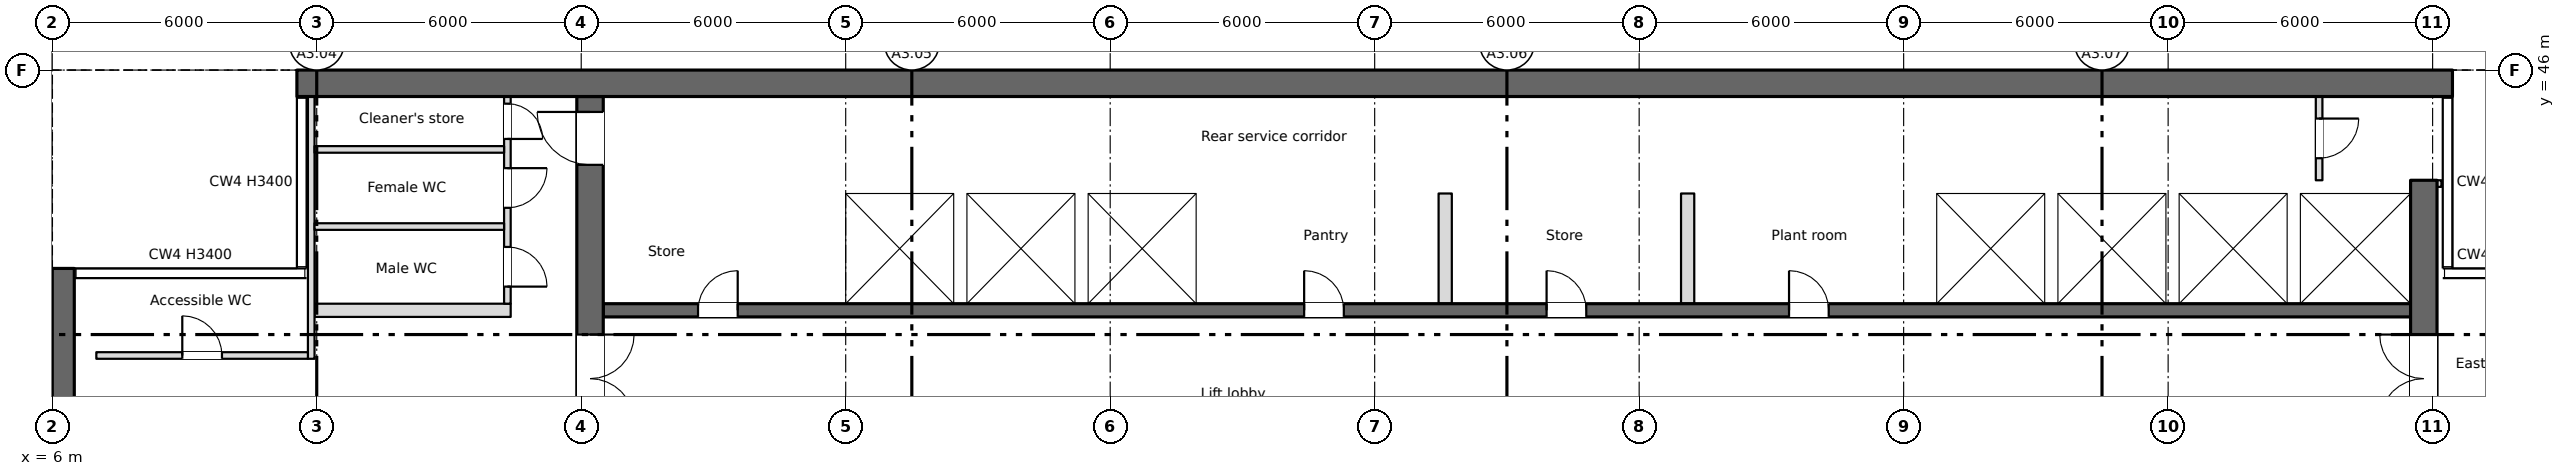
"""IFC4 building model, lengths in metres.
Left out: names, types, materials, properties, quantities, classifications, styles, units other than length and angle.
Written with IfcOpenShell. Run it as: python <this file> out.ifc"""

import sys

from ifc_helpers import new_model, si_unit, direction, frame, frame_2d, origin, place, context, subcontext, project, spatial, rectangle, extrude, element, fill, save


model = new_model("IFC4")
c1 = context("Model", 3, precision=1e-05, world=origin(), true_north=direction((0.0, 1.0)))
c2 = subcontext(c1, "Body", "Model", "MODEL_VIEW")
j1 = project(units=[si_unit("LENGTHUNIT", "METRE"), si_unit("PLANEANGLEUNIT", "RADIAN")], contexts=[c1])
p1 = place(None, origin())
s1 = spatial("IfcSite", under=j1, at=p1, CompositionType="ELEMENT")
p2 = place(p1, origin())
s2 = spatial("IfcBuilding", under=s1, at=p2, CompositionType="ELEMENT")
p3 = place(p2, frame((0.0, 0.0, 258.35)))
s3 = spatial("IfcBuildingStorey", under=s2, at=p3, CompositionType="ELEMENT", Elevation=258.35)
p4 = place(p3, frame((6.25, 8.5, 0.0), z_axis=(0.0, 0.0, 1.0), x_axis=(0.0, 1.0, 0.0)))
e1 = element("IfcWall", 1, at=p4, inside=s3, PredefinedType="SHEAR", context=c2, shape_type="SweptSolid", body=[
    extrude(rectangle(XDim=33.0, YDim=0.5, at=frame_2d((16.5, 0.0))), origin(), (0.0, 0.0, 1.0), 3.4),
])
p5 = place(p4, frame((1.2, 0.0, 0.6)))
e2 = element("IfcOpeningElement", 2, at=p5, cuts=e1, PredefinedType="OPENING", context=c2, shape_type="SweptSolid", body=[
    extrude(rectangle(XDim=0.6, YDim=2.4, at=frame_2d((0.3, 1.2))), frame((0.0, 0.26, 0.0), z_axis=(0.0, -1.0, 0.0), x_axis=(1.0, 0.0, 0.0)), (0.0, 0.0, 1.0), 0.52),
])
p6 = place(p4, frame((7.2, 0.0, 0.6)))
e3 = element("IfcOpeningElement", 3, at=p6, cuts=e1, PredefinedType="OPENING", context=c2, shape_type="SweptSolid", body=[
    extrude(rectangle(XDim=0.6, YDim=2.4, at=frame_2d((0.3, 1.2))), frame((0.0, 0.26, 0.0), z_axis=(0.0, -1.0, 0.0), x_axis=(1.0, 0.0, 0.0)), (0.0, 0.0, 1.0), 0.52),
])
p7 = place(p4, frame((13.2, 0.0, 0.6)))
e4 = element("IfcOpeningElement", 4, at=p7, cuts=e1, PredefinedType="OPENING", context=c2, shape_type="SweptSolid", body=[
    extrude(rectangle(XDim=0.6, YDim=2.4, at=frame_2d((0.3, 1.2))), frame((0.0, 0.26, 0.0), z_axis=(0.0, -1.0, 0.0), x_axis=(1.0, 0.0, 0.0)), (0.0, 0.0, 1.0), 0.52),
])
p8 = place(p3, frame((11.55, 45.7, 0.0), z_axis=(0.0, 0.0, 1.0), x_axis=(1.0, 0.0, 0.0)))
e5 = element("IfcWall", 5, at=p8, inside=s3, PredefinedType="SHEAR", context=c2, shape_type="SweptSolid", body=[
    extrude(rectangle(XDim=48.9, YDim=0.6, at=frame_2d((24.45, 0.0))), origin(), (0.0, 0.0, 1.0), 3.4),
])
p9 = place(p3, frame((6.75, 28.4, 0.0), z_axis=(0.0, 0.0, 1.0), x_axis=(0.0, 1.0, 0.0)))
e6 = element("IfcWall", 6, at=p9, inside=s3, PredefinedType="SHEAR", context=c2, shape_type="SweptSolid", body=[
    extrude(rectangle(XDim=12.85, YDim=0.5, at=frame_2d((6.425, 0.0))), origin(), (0.0, 0.0, 1.0), 3.4),
])
p10 = place(p3, frame((18.2, 28.4, 0.0), z_axis=(0.0, 0.0, 1.0), x_axis=(0.0, 1.0, 0.0)))
e7 = element("IfcWall", 7, at=p10, inside=s3, PredefinedType="SHEAR", context=c2, shape_type="SweptSolid", body=[
    extrude(rectangle(XDim=17.0, YDim=0.6, at=frame_2d((8.5, 0.0))), origin(), (0.0, 0.0, 1.0), 3.4),
])
p11 = place(p10, frame((9.6, 0.0, 0.0)))
e8 = element("IfcOpeningElement", 8, at=p11, cuts=e7, PredefinedType="OPENING", context=c2, shape_type="SweptSolid", body=[
    extrude(rectangle(XDim=2.0, YDim=2.1, at=frame_2d((1.0, 1.05))), frame((0.0, 0.31, 0.0), z_axis=(0.0, -1.0, 0.0), x_axis=(1.0, 0.0, 0.0)), (0.0, 0.0, 1.0), 0.62),
])
p12 = place(p10, frame((15.45, 0.0, 0.0)))
e9 = element("IfcOpeningElement", 9, at=p12, cuts=e7, PredefinedType="OPENING", context=c2, shape_type="SweptSolid", body=[
    extrude(rectangle(XDim=1.2, YDim=2.1, at=frame_2d((0.6, 1.05))), frame((0.0, 0.31, 0.0), z_axis=(0.0, -1.0, 0.0), x_axis=(1.0, 0.0, 0.0)), (0.0, 0.0, 1.0), 0.62),
])
p13 = place(p3, frame((59.8, 28.4, 0.0), z_axis=(0.0, 0.0, 1.0), x_axis=(0.0, 1.0, 0.0)))
e10 = element("IfcWall", 10, at=p13, inside=s3, PredefinedType="SHEAR", context=c2, shape_type="SweptSolid", body=[
    extrude(rectangle(XDim=15.1, YDim=0.6, at=frame_2d((7.55, 0.0))), origin(), (0.0, 0.0, 1.0), 3.4),
])
p14 = place(p13, frame((9.6, 0.0, 0.0)))
e11 = element("IfcOpeningElement", 11, at=p14, cuts=e10, PredefinedType="OPENING", context=c2, shape_type="SweptSolid", body=[
    extrude(rectangle(XDim=2.0, YDim=2.1, at=frame_2d((1.0, 1.05))), frame((0.0, 0.31, 0.0), z_axis=(0.0, -1.0, 0.0), x_axis=(1.0, 0.0, 0.0)), (0.0, 0.0, 1.0), 0.62),
])
p15 = place(p3, frame((18.5, 40.55, 0.0), z_axis=(0.0, 0.0, 1.0), x_axis=(1.0, 0.0, 0.0)))
e12 = element("IfcWall", 12, at=p15, inside=s3, PredefinedType="SHEAR", context=c2, shape_type="SweptSolid", body=[
    extrude(rectangle(XDim=41.0, YDim=0.3, at=frame_2d((20.5, 0.0))), origin(), (0.0, 0.0, 1.0), 3.4),
])
p16 = place(p15, frame((2.15, 0.0, 0.0)))
e13 = element("IfcOpeningElement", 13, at=p16, cuts=e12, PredefinedType="OPENING", context=c2, shape_type="SweptSolid", body=[
    extrude(rectangle(XDim=0.9, YDim=2.1, at=frame_2d((0.45, 1.05))), frame((0.0, 0.16, 0.0), z_axis=(0.0, -1.0, 0.0), x_axis=(1.0, 0.0, 0.0)), (0.0, 0.0, 1.0), 0.32),
])
p17 = place(p15, frame((15.9, 0.0, 0.0)))
e14 = element("IfcOpeningElement", 14, at=p17, cuts=e12, PredefinedType="OPENING", context=c2, shape_type="SweptSolid", body=[
    extrude(rectangle(XDim=0.9, YDim=2.1, at=frame_2d((0.45, 1.05))), frame((0.0, 0.16, 0.0), z_axis=(0.0, -1.0, 0.0), x_axis=(1.0, 0.0, 0.0)), (0.0, 0.0, 1.0), 0.32),
])
p18 = place(p15, frame((21.4, 0.0, 0.0)))
e15 = element("IfcOpeningElement", 15, at=p18, cuts=e12, PredefinedType="OPENING", context=c2, shape_type="SweptSolid", body=[
    extrude(rectangle(XDim=0.9, YDim=2.1, at=frame_2d((0.45, 1.05))), frame((0.0, 0.16, 0.0), z_axis=(0.0, -1.0, 0.0), x_axis=(1.0, 0.0, 0.0)), (0.0, 0.0, 1.0), 0.32),
])
p19 = place(p15, frame((26.9, 0.0, 0.0)))
e16 = element("IfcOpeningElement", 16, at=p19, cuts=e12, PredefinedType="OPENING", context=c2, shape_type="SweptSolid", body=[
    extrude(rectangle(XDim=0.9, YDim=2.1, at=frame_2d((0.45, 1.05))), frame((0.0, 0.16, 0.0), z_axis=(0.0, -1.0, 0.0), x_axis=(1.0, 0.0, 0.0)), (0.0, 0.0, 1.0), 0.32),
])
p20 = place(p15, frame((6.175, 0.0, 0.0)))
e17 = element("IfcOpeningElement", 17, at=p20, cuts=e12, PredefinedType="OPENING", context=c2, shape_type="SweptSolid", body=[
    extrude(rectangle(XDim=1.1, YDim=2.1, at=frame_2d((0.55, 1.05))), frame((0.0, 0.16, 0.0), z_axis=(0.0, -1.0, 0.0), x_axis=(1.0, 0.0, 0.0)), (0.0, 0.0, 1.0), 0.32),
])
p21 = place(p15, frame((8.925, 0.0, 0.0)))
e18 = element("IfcOpeningElement", 18, at=p21, cuts=e12, PredefinedType="OPENING", context=c2, shape_type="SweptSolid", body=[
    extrude(rectangle(XDim=1.1, YDim=2.1, at=frame_2d((0.55, 1.05))), frame((0.0, 0.16, 0.0), z_axis=(0.0, -1.0, 0.0), x_axis=(1.0, 0.0, 0.0)), (0.0, 0.0, 1.0), 0.32),
])
p22 = place(p15, frame((11.675, 0.0, 0.0)))
e19 = element("IfcOpeningElement", 19, at=p22, cuts=e12, PredefinedType="OPENING", context=c2, shape_type="SweptSolid", body=[
    extrude(rectangle(XDim=1.1, YDim=2.1, at=frame_2d((0.55, 1.05))), frame((0.0, 0.16, 0.0), z_axis=(0.0, -1.0, 0.0), x_axis=(1.0, 0.0, 0.0)), (0.0, 0.0, 1.0), 0.32),
])
p23 = place(p15, frame((30.925, 0.0, 0.0)))
e20 = element("IfcOpeningElement", 20, at=p23, cuts=e12, PredefinedType="OPENING", context=c2, shape_type="SweptSolid", body=[
    extrude(rectangle(XDim=1.1, YDim=2.1, at=frame_2d((0.55, 1.05))), frame((0.0, 0.16, 0.0), z_axis=(0.0, -1.0, 0.0), x_axis=(1.0, 0.0, 0.0)), (0.0, 0.0, 1.0), 0.32),
])
p24 = place(p15, frame((33.675, 0.0, 0.0)))
e21 = element("IfcOpeningElement", 21, at=p24, cuts=e12, PredefinedType="OPENING", context=c2, shape_type="SweptSolid", body=[
    extrude(rectangle(XDim=1.1, YDim=2.1, at=frame_2d((0.55, 1.05))), frame((0.0, 0.16, 0.0), z_axis=(0.0, -1.0, 0.0), x_axis=(1.0, 0.0, 0.0)), (0.0, 0.0, 1.0), 0.32),
])
p25 = place(p15, frame((36.375, 0.0, 0.0)))
e22 = element("IfcOpeningElement", 22, at=p25, cuts=e12, PredefinedType="OPENING", context=c2, shape_type="SweptSolid", body=[
    extrude(rectangle(XDim=1.2, YDim=2.1, at=frame_2d((0.6, 1.05))), frame((0.0, 0.16, 0.0), z_axis=(0.0, -1.0, 0.0), x_axis=(1.0, 0.0, 0.0)), (0.0, 0.0, 1.0), 0.32),
])
p26 = place(p15, frame((39.15, 0.0, 0.0)))
e23 = element("IfcOpeningElement", 23, at=p26, cuts=e12, PredefinedType="OPENING", context=c2, shape_type="SweptSolid", body=[
    extrude(rectangle(XDim=1.2, YDim=2.1, at=frame_2d((0.6, 1.05))), frame((0.0, 0.16, 0.0), z_axis=(0.0, -1.0, 0.0), x_axis=(1.0, 0.0, 0.0)), (0.0, 0.0, 1.0), 0.32),
])
p27 = place(p3, frame((18.5, 43.35, 0.0), z_axis=(0.0, 0.0, 1.0), x_axis=(1.0, 0.0, 0.0)))
e24 = element("IfcWall", 24, at=p27, inside=s3, PredefinedType="SHEAR", context=c2, shape_type="SweptSolid", body=[
    extrude(rectangle(XDim=41.0, YDim=0.3, at=frame_2d((20.5, 0.0))), origin(), (0.0, 0.0, 1.0), 3.4),
])
p28 = place(p3, frame((11.95, 40.55, 0.0), z_axis=(0.0, 0.0, 1.0), x_axis=(1.0, 0.0, 0.0)))
e25 = element("IfcWall", 25, at=p28, inside=s3, PredefinedType="PARTITIONING", context=c2, shape_type="SweptSolid", body=[
    extrude(rectangle(XDim=4.45, YDim=0.3, at=frame_2d((2.225, 0.0))), origin(), (0.0, 0.0, 1.0), 3.4),
])
for number, where, z_axis, x_axis in (
    (26, (23.85, 40.7, 0.0), (0.0, 0.0, 1.0), (0.0, 1.0, 0.0)),
    (27, (26.6, 40.7, 0.0), (0.0, 0.0, 1.0), (0.0, 1.0, 0.0)),
    (28, (29.35, 40.7, 0.0), (0.0, 0.0, 1.0), (0.0, 1.0, 0.0)),
    (29, (32.1, 40.7, 0.0), (0.0, 0.0, 1.0), (0.0, 1.0, 0.0)),
    (30, (48.6, 40.7, 0.0), (0.0, 0.0, 1.0), (0.0, 1.0, 0.0)),
    (31, (51.35, 40.7, 0.0), (0.0, 0.0, 1.0), (0.0, 1.0, 0.0)),
    (32, (54.1, 40.7, 0.0), (0.0, 0.0, 1.0), (0.0, 1.0, 0.0)),
    (33, (56.85, 40.7, 0.0), (0.0, 0.0, 1.0), (0.0, 1.0, 0.0)),
):
    element("IfcWall", number, at=place(p3, frame(where, z_axis=z_axis, x_axis=x_axis)), inside=s3, PredefinedType="SHEAR", context=c2, shape_type="SweptSolid", body=[
        extrude(rectangle(XDim=2.5, YDim=0.3, at=frame_2d((1.25, 0.0))), origin(), (0.0, 0.0, 1.0), 3.4),
    ])
p29 = place(p3, frame((16.325, 45.4, 0.0), z_axis=(0.0, 0.0, 1.0), x_axis=(0.0, -1.0, 0.0)))
e34 = element("IfcWall", 34, at=p29, inside=s3, PredefinedType="PARTITIONING", context=c2, shape_type="SweptSolid", body=[
    extrude(rectangle(XDim=4.7, YDim=0.15, at=frame_2d((2.35, 0.0))), origin(), (0.0, 0.0, 1.0), 3.4),
])
p30 = place(p29, frame((3.413, 0.0, 0.0)))
e35 = element("IfcOpeningElement", 35, at=p30, cuts=e34, PredefinedType="OPENING", context=c2, shape_type="SweptSolid", body=[
    extrude(rectangle(XDim=0.9, YDim=2.1, at=frame_2d((0.45, 1.05))), frame((0.0, 0.085, 0.0), z_axis=(0.0, -1.0, 0.0), x_axis=(1.0, 0.0, 0.0)), (0.0, 0.0, 1.0), 0.17),
])
p31 = place(p29, frame((1.625, 0.0, 0.0)))
e36 = element("IfcOpeningElement", 36, at=p31, cuts=e34, PredefinedType="OPENING", context=c2, shape_type="SweptSolid", body=[
    extrude(rectangle(XDim=0.9, YDim=2.1, at=frame_2d((0.45, 1.05))), frame((0.0, 0.085, 0.0), z_axis=(0.0, -1.0, 0.0), x_axis=(1.0, 0.0, 0.0)), (0.0, 0.0, 1.0), 0.17),
])
p32 = place(p29, frame((0.163, 0.0, 0.0)))
e37 = element("IfcOpeningElement", 37, at=p32, cuts=e34, PredefinedType="OPENING", context=c2, shape_type="SweptSolid", body=[
    extrude(rectangle(XDim=0.8, YDim=2.1, at=frame_2d((0.4, 1.05))), frame((0.0, 0.085, 0.0), z_axis=(0.0, -1.0, 0.0), x_axis=(1.0, 0.0, 0.0)), (0.0, 0.0, 1.0), 0.17),
])
p33 = place(p3, frame((11.875, 39.45, 0.0), z_axis=(0.0, 0.0, 1.0), x_axis=(0.0, 1.0, 0.0)))
e38 = element("IfcWall", 38, at=p33, inside=s3, PredefinedType="PARTITIONING", context=c2, shape_type="SweptSolid", body=[
    extrude(rectangle(XDim=5.95, YDim=0.15, at=frame_2d((2.975, 0.0))), origin(), (0.0, 0.0, 1.0), 3.4),
])
p34 = place(p3, frame((7.0, 39.525, 0.0), z_axis=(0.0, 0.0, 1.0), x_axis=(1.0, 0.0, 0.0)))
e39 = element("IfcWall", 39, at=p34, inside=s3, PredefinedType="PARTITIONING", context=c2, shape_type="SweptSolid", body=[
    extrude(rectangle(XDim=4.8, YDim=0.15, at=frame_2d((2.4, 0.0))), origin(), (0.0, 0.0, 1.0), 3.4),
])
p35 = place(p34, frame((1.95, 0.0, 0.0)))
e40 = element("IfcOpeningElement", 40, at=p35, cuts=e39, PredefinedType="OPENING", context=c2, shape_type="SweptSolid", body=[
    extrude(rectangle(XDim=0.9, YDim=2.1, at=frame_2d((0.45, 1.05))), frame((0.0, 0.085, 0.0), z_axis=(0.0, -1.0, 0.0), x_axis=(1.0, 0.0, 0.0)), (0.0, 0.0, 1.0), 0.17),
])
for number, where, z_axis, x_axis in (
    (41, (11.95, 42.45, 0.0), (0.0, 0.0, 1.0), (1.0, 0.0, 0.0)),
    (42, (11.95, 44.2, 0.0), (0.0, 0.0, 1.0), (1.0, 0.0, 0.0)),
):
    element("IfcWall", number, at=place(p3, frame(where, z_axis=z_axis, x_axis=x_axis)), inside=s3, PredefinedType="PARTITIONING", context=c2, shape_type="SweptSolid", body=[
        extrude(rectangle(XDim=4.3, YDim=0.15, at=frame_2d((2.15, 0.0))), origin(), (0.0, 0.0, 1.0), 3.4),
    ])
p36 = place(p3, frame((57.425, 45.4, 0.0), z_axis=(0.0, 0.0, 1.0), x_axis=(0.0, -1.0, 0.0)))
e43 = element("IfcWall", 43, at=p36, inside=s3, PredefinedType="PARTITIONING", context=c2, shape_type="SweptSolid", body=[
    extrude(rectangle(XDim=1.9, YDim=0.15, at=frame_2d((0.95, 0.0))), origin(), (0.0, 0.0, 1.0), 3.4),
])
p37 = place(p36, frame((0.5, 0.0, 0.0)))
e44 = element("IfcOpeningElement", 44, at=p37, cuts=e43, PredefinedType="OPENING", context=c2, shape_type="SweptSolid", body=[
    extrude(rectangle(XDim=0.9, YDim=2.1, at=frame_2d((0.45, 1.05))), frame((0.0, 0.085, 0.0), z_axis=(0.0, -1.0, 0.0), x_axis=(1.0, 0.0, 0.0)), (0.0, 0.0, 1.0), 0.17),
])
p38 = place(p3, frame((60.15, 43.35, 0.0), z_axis=(0.0, 0.0, 1.0), x_axis=(0.0, 1.0, 0.0)))
e45 = element("IfcWall", 45, at=p38, inside=s3, PredefinedType="PARTITIONING", context=c2, shape_type="SweptSolid", body=[
    extrude(rectangle(XDim=0.15, YDim=0.1, at=frame_2d((0.075, 0.0))), origin(), (0.0, 0.0, 1.0), 3.4),
])
for number, where, z_axis, x_axis in (
    (46, (37.6, 40.7, 0.0), (0.0, 0.0, 1.0), (0.0, 1.0, 0.0)),
    (47, (43.1, 40.7, 0.0), (0.0, 0.0, 1.0), (0.0, 1.0, 0.0)),
):
    element("IfcWall", number, at=place(p3, frame(where, z_axis=z_axis, x_axis=x_axis)), inside=s3, PredefinedType="PARTITIONING", context=c2, shape_type="SweptSolid", body=[
        extrude(rectangle(XDim=2.5, YDim=0.3, at=frame_2d((1.25, 0.0))), origin(), (0.0, 0.0, 1.0), 3.4),
    ])
p39 = place(p35, origin())
e48 = element("IfcDoor", 48, at=p39, inside=s3, OperationType="SINGLE_SWING_LEFT", PredefinedType="DOOR", context=c2, shape_type="SweptSolid", body=[
    extrude(rectangle(XDim=0.9, YDim=2.1, at=frame_2d((0.45, 1.05))), frame((0.0, 0.025, 0.0), z_axis=(0.0, -1.0, 0.0), x_axis=(1.0, 0.0, 0.0)), (0.0, 0.0, 1.0), 0.05),
])
fill(e40, e48)
p40 = place(p30, origin())
e49 = element("IfcDoor", 49, at=p40, inside=s3, OperationType="SINGLE_SWING_RIGHT", PredefinedType="DOOR", context=c2, shape_type="SweptSolid", body=[
    extrude(rectangle(XDim=0.9, YDim=2.1, at=frame_2d((0.45, 1.05))), frame((0.0, 0.025, 0.0), z_axis=(0.0, -1.0, 0.0), x_axis=(1.0, 0.0, 0.0)), (0.0, 0.0, 1.0), 0.05),
])
fill(e35, e49)
p41 = place(p31, origin())
e50 = element("IfcDoor", 50, at=p41, inside=s3, OperationType="SINGLE_SWING_LEFT", PredefinedType="DOOR", context=c2, shape_type="SweptSolid", body=[
    extrude(rectangle(XDim=0.9, YDim=2.1, at=frame_2d((0.45, 1.05))), frame((0.0, 0.025, 0.0), z_axis=(0.0, -1.0, 0.0), x_axis=(1.0, 0.0, 0.0)), (0.0, 0.0, 1.0), 0.05),
])
fill(e36, e50)
p42 = place(p32, origin())
e51 = element("IfcDoor", 51, at=p42, inside=s3, OperationType="SINGLE_SWING_RIGHT", PredefinedType="DOOR", context=c2, shape_type="SweptSolid", body=[
    extrude(rectangle(XDim=0.8, YDim=2.1, at=frame_2d((0.4, 1.05))), frame((0.0, 0.025, 0.0), z_axis=(0.0, -1.0, 0.0), x_axis=(1.0, 0.0, 0.0)), (0.0, 0.0, 1.0), 0.05),
])
fill(e37, e51)
p43 = place(p37, origin())
e52 = element("IfcDoor", 52, at=p43, inside=s3, OperationType="SINGLE_SWING_LEFT", PredefinedType="DOOR", context=c2, shape_type="SweptSolid", body=[
    extrude(rectangle(XDim=0.9, YDim=2.1, at=frame_2d((0.45, 1.05))), frame((0.0, 0.025, 0.0), z_axis=(0.0, -1.0, 0.0), x_axis=(1.0, 0.0, 0.0)), (0.0, 0.0, 1.0), 0.05),
])
fill(e44, e52)
p44 = place(p16, origin())
e53 = element("IfcDoor", 53, at=p44, inside=s3, OperationType="SINGLE_SWING_RIGHT", PredefinedType="DOOR", context=c2, shape_type="SweptSolid", body=[
    extrude(rectangle(XDim=0.9, YDim=2.1, at=frame_2d((0.45, 1.05))), frame((0.0, 0.025, 0.0), z_axis=(0.0, -1.0, 0.0), x_axis=(1.0, 0.0, 0.0)), (0.0, 0.0, 1.0), 0.05),
])
fill(e13, e53)
p45 = place(p17, origin())
e54 = element("IfcDoor", 54, at=p45, inside=s3, OperationType="SINGLE_SWING_LEFT", PredefinedType="DOOR", context=c2, shape_type="SweptSolid", body=[
    extrude(rectangle(XDim=0.9, YDim=2.1, at=frame_2d((0.45, 1.05))), frame((0.0, 0.025, 0.0), z_axis=(0.0, -1.0, 0.0), x_axis=(1.0, 0.0, 0.0)), (0.0, 0.0, 1.0), 0.05),
])
fill(e14, e54)
p46 = place(p18, origin())
e55 = element("IfcDoor", 55, at=p46, inside=s3, OperationType="SINGLE_SWING_LEFT", PredefinedType="DOOR", context=c2, shape_type="SweptSolid", body=[
    extrude(rectangle(XDim=0.9, YDim=2.1, at=frame_2d((0.45, 1.05))), frame((0.0, 0.025, 0.0), z_axis=(0.0, -1.0, 0.0), x_axis=(1.0, 0.0, 0.0)), (0.0, 0.0, 1.0), 0.05),
])
fill(e15, e55)
p47 = place(p19, origin())
e56 = element("IfcDoor", 56, at=p47, inside=s3, OperationType="SINGLE_SWING_LEFT", PredefinedType="DOOR", context=c2, shape_type="SweptSolid", body=[
    extrude(rectangle(XDim=0.9, YDim=2.1, at=frame_2d((0.45, 1.05))), frame((0.0, 0.025, 0.0), z_axis=(0.0, -1.0, 0.0), x_axis=(1.0, 0.0, 0.0)), (0.0, 0.0, 1.0), 0.05),
])
fill(e16, e56)
p48 = place(p20, origin())
e57 = element("IfcDoor", 57, at=p48, inside=s3, OperationType="SLIDING_TO_LEFT", PredefinedType="DOOR", context=c2, shape_type="SweptSolid", body=[
    extrude(rectangle(XDim=1.1, YDim=2.1, at=frame_2d((0.55, 1.05))), frame((0.0, 0.025, 0.0), z_axis=(0.0, -1.0, 0.0), x_axis=(1.0, 0.0, 0.0)), (0.0, 0.0, 1.0), 0.05),
])
fill(e17, e57)
p49 = place(p21, origin())
e58 = element("IfcDoor", 58, at=p49, inside=s3, OperationType="SLIDING_TO_LEFT", PredefinedType="DOOR", context=c2, shape_type="SweptSolid", body=[
    extrude(rectangle(XDim=1.1, YDim=2.1, at=frame_2d((0.55, 1.05))), frame((0.0, 0.025, 0.0), z_axis=(0.0, -1.0, 0.0), x_axis=(1.0, 0.0, 0.0)), (0.0, 0.0, 1.0), 0.05),
])
fill(e18, e58)
p50 = place(p22, origin())
e59 = element("IfcDoor", 59, at=p50, inside=s3, OperationType="SLIDING_TO_LEFT", PredefinedType="DOOR", context=c2, shape_type="SweptSolid", body=[
    extrude(rectangle(XDim=1.1, YDim=2.1, at=frame_2d((0.55, 1.05))), frame((0.0, 0.025, 0.0), z_axis=(0.0, -1.0, 0.0), x_axis=(1.0, 0.0, 0.0)), (0.0, 0.0, 1.0), 0.05),
])
fill(e19, e59)
p51 = place(p23, origin())
e60 = element("IfcDoor", 60, at=p51, inside=s3, OperationType="SLIDING_TO_LEFT", PredefinedType="DOOR", context=c2, shape_type="SweptSolid", body=[
    extrude(rectangle(XDim=1.1, YDim=2.1, at=frame_2d((0.55, 1.05))), frame((0.0, 0.025, 0.0), z_axis=(0.0, -1.0, 0.0), x_axis=(1.0, 0.0, 0.0)), (0.0, 0.0, 1.0), 0.05),
])
fill(e20, e60)
p52 = place(p24, origin())
e61 = element("IfcDoor", 61, at=p52, inside=s3, OperationType="SLIDING_TO_LEFT", PredefinedType="DOOR", context=c2, shape_type="SweptSolid", body=[
    extrude(rectangle(XDim=1.1, YDim=2.1, at=frame_2d((0.55, 1.05))), frame((0.0, 0.025, 0.0), z_axis=(0.0, -1.0, 0.0), x_axis=(1.0, 0.0, 0.0)), (0.0, 0.0, 1.0), 0.05),
])
fill(e21, e61)
p53 = place(p25, origin())
e62 = element("IfcDoor", 62, at=p53, inside=s3, OperationType="SLIDING_TO_LEFT", PredefinedType="DOOR", context=c2, shape_type="SweptSolid", body=[
    extrude(rectangle(XDim=1.2, YDim=2.1, at=frame_2d((0.6, 1.05))), frame((0.0, 0.025, 0.0), z_axis=(0.0, -1.0, 0.0), x_axis=(1.0, 0.0, 0.0)), (0.0, 0.0, 1.0), 0.05),
])
fill(e22, e62)
p54 = place(p26, origin())
e63 = element("IfcDoor", 63, at=p54, inside=s3, OperationType="SLIDING_TO_LEFT", PredefinedType="DOOR", context=c2, shape_type="SweptSolid", body=[
    extrude(rectangle(XDim=1.2, YDim=2.1, at=frame_2d((0.6, 1.05))), frame((0.0, 0.025, 0.0), z_axis=(0.0, -1.0, 0.0), x_axis=(1.0, 0.0, 0.0)), (0.0, 0.0, 1.0), 0.05),
])
fill(e23, e63)
p55 = place(p11, origin())
e64 = element("IfcDoor", 64, at=p55, inside=s3, OperationType="DOUBLE_DOOR_SINGLE_SWING", PredefinedType="DOOR", context=c2, shape_type="SweptSolid", body=[
    extrude(rectangle(XDim=2.0, YDim=2.1, at=frame_2d((1.0, 1.05))), frame((0.0, 0.025, 0.0), z_axis=(0.0, -1.0, 0.0), x_axis=(1.0, 0.0, 0.0)), (0.0, 0.0, 1.0), 0.05),
])
fill(e8, e64)
p56 = place(p14, origin())
e65 = element("IfcDoor", 65, at=p56, inside=s3, OperationType="DOUBLE_DOOR_SINGLE_SWING", PredefinedType="DOOR", context=c2, shape_type="SweptSolid", body=[
    extrude(rectangle(XDim=2.0, YDim=2.1, at=frame_2d((1.0, 1.05))), frame((0.0, 0.025, 0.0), z_axis=(0.0, -1.0, 0.0), x_axis=(1.0, 0.0, 0.0)), (0.0, 0.0, 1.0), 0.05),
])
fill(e11, e65)
p57 = place(p12, origin())
e66 = element("IfcDoor", 66, at=p57, inside=s3, OperationType="SINGLE_SWING_RIGHT", PredefinedType="DOOR", context=c2, shape_type="SweptSolid", body=[
    extrude(rectangle(XDim=1.2, YDim=2.1, at=frame_2d((0.6, 1.05))), frame((0.0, 0.025, 0.0), z_axis=(0.0, -1.0, 0.0), x_axis=(1.0, 0.0, 0.0)), (0.0, 0.0, 1.0), 0.05),
])
fill(e9, e66)
save(model, sys.argv[1])
